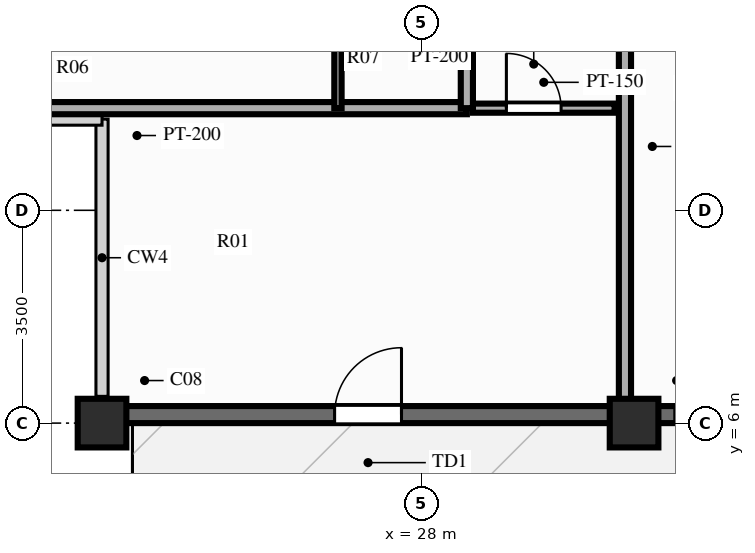
"""IFC4 building model, lengths in metres.
Left out: names, types, materials, properties, quantities, classifications, styles, units other than length and angle.
Written with IfcOpenShell. Run it as: python <this file> out.ifc"""

import sys

from ifc_helpers import new_model, si_unit, direction, frame, frame_2d, origin, origin_2d, place, context, subcontext, project, spatial, rectangle, extrude, source, transform, mapped, element, fill, save


model = new_model("IFC4")
c1 = context("Model", 3, precision=1e-05, world=origin(), true_north=direction((0.0, 1.0)))
c2 = subcontext(c1, "Body", "Model", "MODEL_VIEW")
j1 = project(units=[si_unit("LENGTHUNIT", "METRE"), si_unit("PLANEANGLEUNIT", "RADIAN")], contexts=[c1])
p1 = place(None, origin())
s1 = spatial("IfcSite", under=j1, at=p1, CompositionType="ELEMENT")
p2 = place(p1, origin())
s2 = spatial("IfcBuilding", under=s1, at=p2, CompositionType="ELEMENT")
p3 = place(p2, frame((0.0, 0.0, 176.8)))
s3 = spatial("IfcBuildingStorey", under=s2, at=p3, CompositionType="ELEMENT", Elevation=176.8)
m1 = source(origin(), c2, "Body", "SweptSolid", [
    extrude(rectangle(XDim=0.8, YDim=0.8, at=origin_2d()), origin(), (0.0, 0.0, 1.0), 3.0),
])
for number, where, z_axis, x_axis in (
    (1, (22.75, 6.0, 0.0), (0.0, 0.0, 1.0), (1.0, 0.0, 0.0)),
    (2, (31.5, 6.0, 0.0), (0.0, 0.0, 1.0), (1.0, 0.0, 0.0)),
):
    element("IfcColumn", number, at=place(p3, frame(where, z_axis=z_axis, x_axis=x_axis)), inside=s3, PredefinedType="COLUMN", context=c2, shape_type="MappedRepresentation", body=[
        mapped(m1, transform((0.0, 0.0, 0.0), scale=1.0)),
    ])
p4 = place(p3, frame((22.75, 6.14, 0.0), z_axis=(0.0, 0.0, 1.0), x_axis=(1.0, 0.0, 0.0)))
e3 = element("IfcWall", 3, at=p4, inside=s3, PredefinedType="SOLIDWALL", context=c2, shape_type="SweptSolid", body=[
    extrude(rectangle(XDim=30.5, YDim=0.28, at=frame_2d((15.25, 0.0))), origin(), (0.0, 0.0, 1.0), 2.28),
])
p5 = place(p4, frame((4.925, 0.0, 0.0), z_axis=(0.0, 0.0, 1.0), x_axis=(-1.0, 0.0, 0.0)))
e4 = element("IfcOpeningElement", 4, at=p5, cuts=e3, PredefinedType="OPENING", context=c2, shape_type="SweptSolid", body=[
    extrude(rectangle(XDim=1.1, YDim=2.15, at=frame_2d((0.55, 1.075))), frame((0.0, 0.152, 0.0), z_axis=(0.0, -1.0, 0.0), x_axis=(1.0, 0.0, 0.0)), (0.0, 0.0, 1.0), 0.304),
])
p6 = place(p4, frame((9.42, 0.0, 0.25)))
e5 = element("IfcOpeningElement", 5, at=p6, cuts=e3, PredefinedType="OPENING", context=c2, shape_type="SweptSolid", body=[
    extrude(rectangle(XDim=0.95, YDim=1.5, at=frame_2d((0.475, 0.75))), frame((0.0, 0.152, 0.0), z_axis=(0.0, -1.0, 0.0), x_axis=(1.0, 0.0, 0.0)), (0.0, 0.0, 1.0), 0.304),
])
p7 = place(p4, frame((11.244, 0.0, 0.25)))
e6 = element("IfcOpeningElement", 6, at=p7, cuts=e3, PredefinedType="OPENING", context=c2, shape_type="SweptSolid", body=[
    extrude(rectangle(XDim=1.2, YDim=1.5, at=frame_2d((0.6, 0.75))), frame((0.0, 0.152, 0.0), z_axis=(0.0, -1.0, 0.0), x_axis=(1.0, 0.0, 0.0)), (0.0, 0.0, 1.0), 0.304),
])
p8 = place(p4, frame((13.602, 0.0, 0.25)))
e7 = element("IfcOpeningElement", 7, at=p8, cuts=e3, PredefinedType="OPENING", context=c2, shape_type="SweptSolid", body=[
    extrude(rectangle(XDim=1.2, YDim=1.5, at=frame_2d((0.6, 0.75))), frame((0.0, 0.152, 0.0), z_axis=(0.0, -1.0, 0.0), x_axis=(1.0, 0.0, 0.0)), (0.0, 0.0, 1.0), 0.304),
])
p9 = place(p4, frame((16.683, 0.0, 0.25)))
e8 = element("IfcOpeningElement", 8, at=p9, cuts=e3, PredefinedType="OPENING", context=c2, shape_type="SweptSolid", body=[
    extrude(rectangle(XDim=1.2, YDim=1.5, at=frame_2d((0.6, 0.75))), frame((0.0, 0.152, 0.0), z_axis=(0.0, -1.0, 0.0), x_axis=(1.0, 0.0, 0.0)), (0.0, 0.0, 1.0), 0.304),
])
p10 = place(p4, frame((19.68, 0.0, 0.25)))
e9 = element("IfcOpeningElement", 9, at=p10, cuts=e3, PredefinedType="OPENING", context=c2, shape_type="SweptSolid", body=[
    extrude(rectangle(XDim=1.2, YDim=1.5, at=frame_2d((0.6, 0.75))), frame((0.0, 0.152, 0.0), z_axis=(0.0, -1.0, 0.0), x_axis=(1.0, 0.0, 0.0)), (0.0, 0.0, 1.0), 0.304),
])
p11 = place(p4, frame((25.525, 0.0, 0.25)))
e10 = element("IfcOpeningElement", 10, at=p11, cuts=e3, PredefinedType="OPENING", context=c2, shape_type="SweptSolid", body=[
    extrude(rectangle(XDim=1.2, YDim=1.5, at=frame_2d((0.6, 0.75))), frame((0.0, 0.152, 0.0), z_axis=(0.0, -1.0, 0.0), x_axis=(1.0, 0.0, 0.0)), (0.0, 0.0, 1.0), 0.304),
])
p12 = place(p3, frame((28.85, 11.18, 0.0), z_axis=(0.0, 0.0, 1.0), x_axis=(1.0, 0.0, 0.0)))
e11 = element("IfcWall", 11, at=p12, inside=s3, PredefinedType="PARTITIONING", context=c2, shape_type="SweptSolid", body=[
    extrude(rectangle(XDim=2.33, YDim=0.15, at=frame_2d((1.165, 0.0))), origin(), (0.0, 0.0, 1.0), 2.79),
])
p13 = place(p12, frame((0.55, 0.0, 0.0)))
e12 = element("IfcOpeningElement", 12, at=p13, cuts=e11, PredefinedType="OPENING", context=c2, shape_type="SweptSolid", body=[
    extrude(rectangle(XDim=0.9, YDim=2.1, at=frame_2d((0.45, 1.05))), frame((0.0, 0.087, 0.0), z_axis=(0.0, -1.0, 0.0), x_axis=(1.0, 0.0, 0.0)), (0.0, 0.0, 1.0), 0.174),
])
p14 = place(p3, frame((31.35, 14.95, 0.0), z_axis=(0.0, 0.0, 1.0), x_axis=(0.0, -1.0, 0.0)))
e13 = element("IfcWall", 13, at=p14, inside=s3, PredefinedType="PARTITIONING", context=c2, shape_type="SweptSolid", body=[
    extrude(rectangle(XDim=8.8, YDim=0.2, at=frame_2d((4.4, 0.0))), origin(), (0.0, 0.0, 1.0), 2.39),
])
p15 = place(p3, frame((28.75, 11.18, 0.0), z_axis=(0.0, 0.0, 1.0), x_axis=(-1.0, 0.0, 0.0)))
e14 = element("IfcWall", 14, at=p15, inside=s3, PredefinedType="PARTITIONING", context=c2, shape_type="SweptSolid", body=[
    extrude(rectangle(XDim=10.85, YDim=0.2, at=frame_2d((5.425, 0.0))), origin(), (0.0, 0.0, 1.0), 2.79),
])
p16 = place(p3, frame((28.75, 11.18, 0.0), z_axis=(0.0, 0.0, 1.0), x_axis=(0.0, 1.0, 0.0)))
e15 = element("IfcWall", 15, at=p16, inside=s3, PredefinedType="PARTITIONING", context=c2, shape_type="SweptSolid", body=[
    extrude(rectangle(XDim=2.75, YDim=0.2, at=frame_2d((1.375, 0.0))), origin(), (0.0, 0.0, 1.0), 2.79),
])
p17 = place(p3, frame((26.63, 11.18, 0.0), z_axis=(0.0, 0.0, 1.0), x_axis=(0.0, 1.0, 0.0)))
e16 = element("IfcWall", 16, at=p17, inside=s3, PredefinedType="PARTITIONING", context=c2, shape_type="SweptSolid", body=[
    extrude(rectangle(XDim=2.75, YDim=0.12, at=frame_2d((1.375, 0.0))), origin(), (0.0, 0.0, 1.0), 2.79),
])
m2 = source(origin(), c2, "Body", "SweptSolid", [
    extrude(rectangle(XDim=1.1, YDim=2.15, at=frame_2d((0.55, 1.075))), frame((0.0, 0.025, 0.0), z_axis=(0.0, -1.0, 0.0), x_axis=(1.0, 0.0, 0.0)), (0.0, 0.0, 1.0), 0.05),
])
p18 = place(p5, origin())
e17 = element("IfcDoor", 17, at=p18, inside=s3, OperationType="SINGLE_SWING_LEFT", PredefinedType="DOOR", context=c2, shape_type="MappedRepresentation", body=[
    mapped(m2, transform((0.0, 0.0, 0.0), scale=1.0)),
])
fill(e4, e17)
m3 = source(origin(), c2, "Body", "SweptSolid", [
    extrude(rectangle(XDim=0.95, YDim=1.5, at=frame_2d((0.475, 0.75))), frame((0.0, 0.03, 0.0), z_axis=(0.0, -1.0, 0.0), x_axis=(1.0, 0.0, 0.0)), (0.0, 0.0, 1.0), 0.06),
])
p19 = place(p6, origin())
e18 = element("IfcWindow", 18, at=p19, inside=s3, PartitioningType="SINGLE_PANEL", PredefinedType="WINDOW", context=c2, shape_type="MappedRepresentation", body=[
    mapped(m3, transform((0.0, 0.0, 0.0), scale=1.0)),
])
fill(e5, e18)
m4 = source(origin(), c2, "Body", "SweptSolid", [
    extrude(rectangle(XDim=0.9, YDim=2.1, at=frame_2d((0.45, 1.05))), frame((0.0, 0.025, 0.0), z_axis=(0.0, -1.0, 0.0), x_axis=(1.0, 0.0, 0.0)), (0.0, 0.0, 1.0), 0.05),
])
p20 = place(p13, origin())
e19 = element("IfcDoor", 19, at=p20, inside=s3, OperationType="SINGLE_SWING_LEFT", PredefinedType="DOOR", context=c2, shape_type="MappedRepresentation", body=[
    mapped(m4, transform((0.0, 0.0, 0.0), scale=1.0)),
])
fill(e12, e19)
save(model, sys.argv[1])
